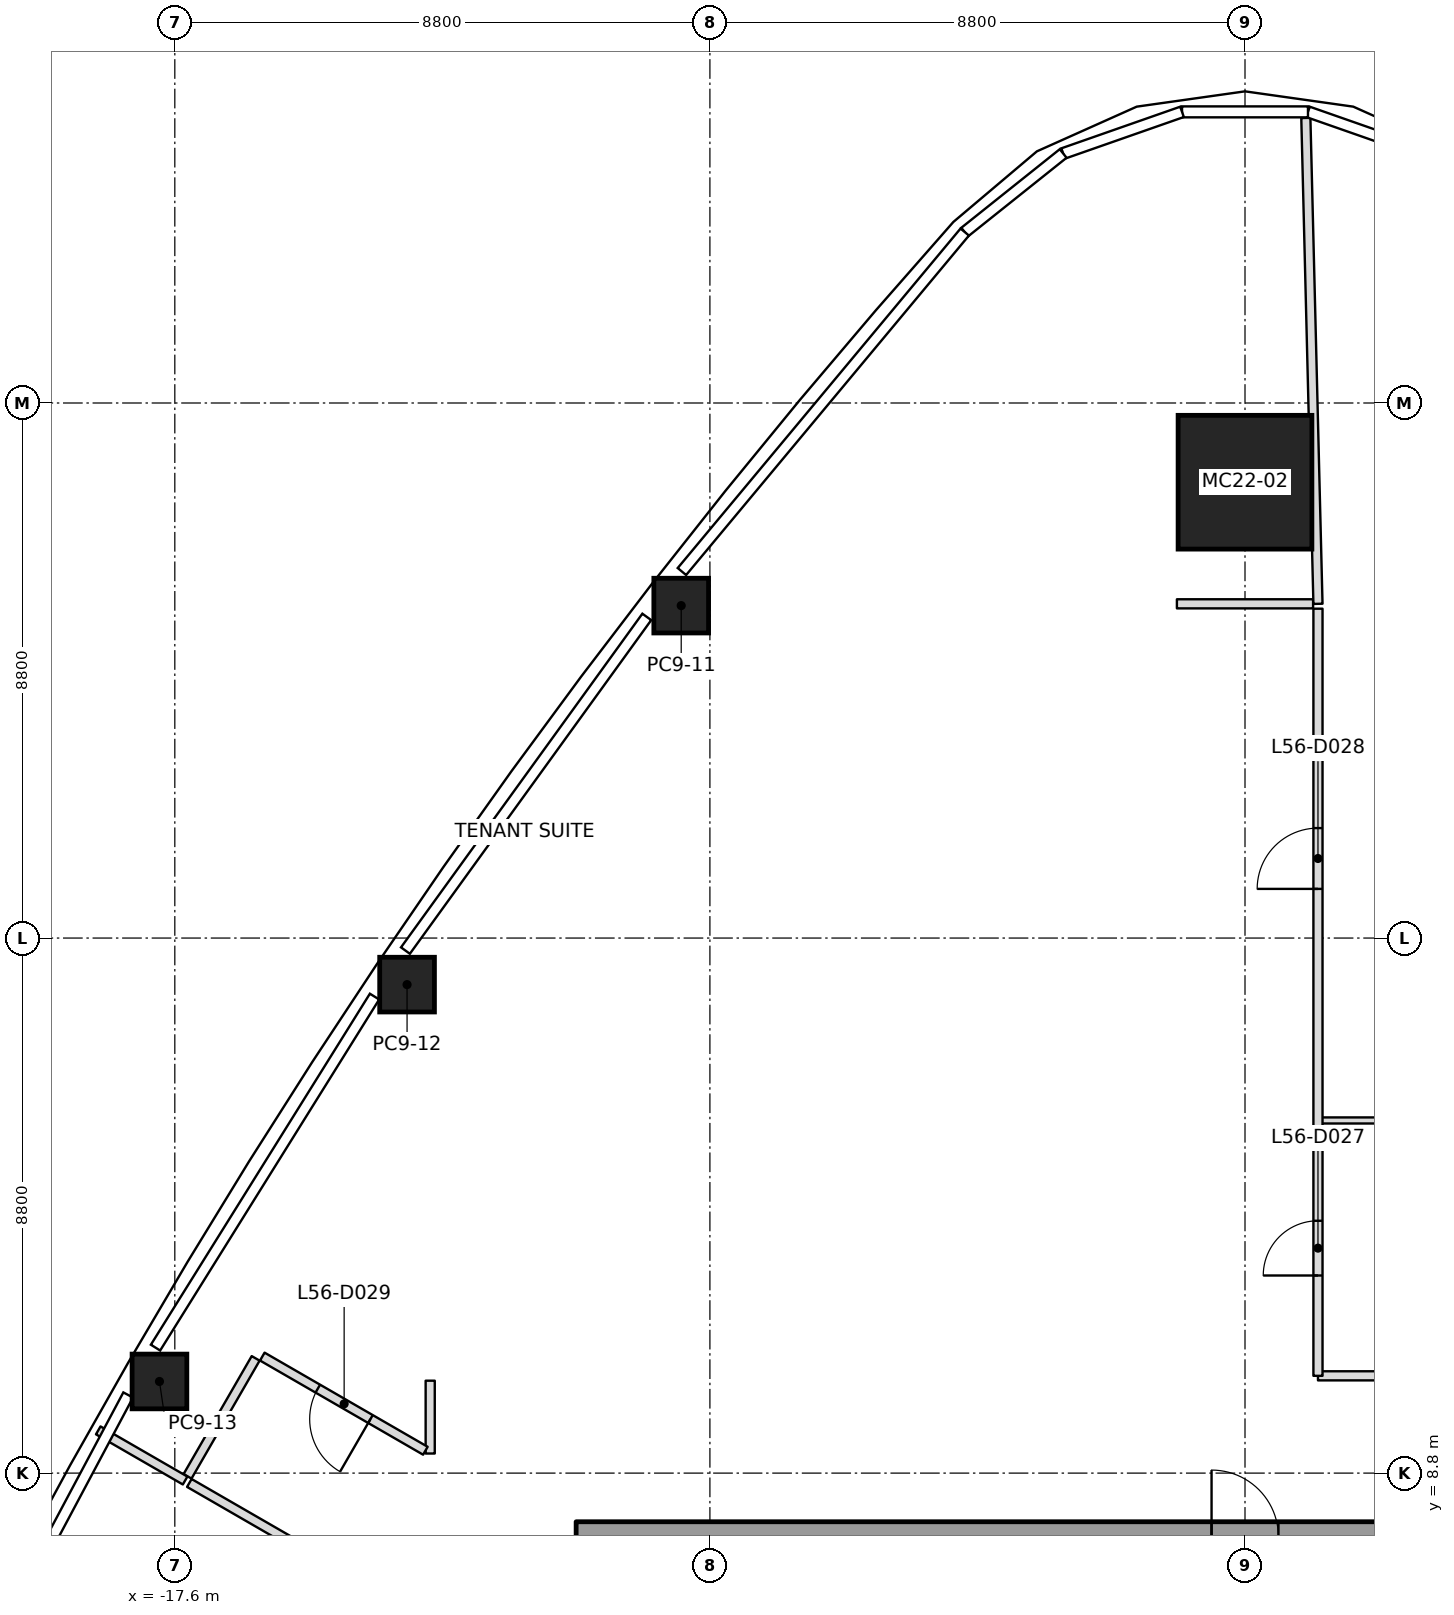
"""IFC4 building model, lengths in metres.
Left out: names, types, materials, properties, quantities, classifications, styles, units other than length and angle.
Written with IfcOpenShell. Run it as: python <this file> out.ifc"""

import sys

from ifc_helpers import new_model, si_unit, direction, frame, frame_2d, origin, origin_2d, place, context, subcontext, project, spatial, rectangle, extrude, element, fill, save


model = new_model("IFC4")
c1 = context("Model", 3, precision=1e-05, world=origin(), true_north=direction((0.0, 1.0)))
c2 = subcontext(c1, "Body", "Model", "MODEL_VIEW")
j1 = project(units=[si_unit("LENGTHUNIT", "METRE"), si_unit("PLANEANGLEUNIT", "RADIAN")], contexts=[c1])
p1 = place(None, origin())
s1 = spatial("IfcSite", under=j1, at=p1, CompositionType="ELEMENT")
p2 = place(p1, origin())
s2 = spatial("IfcBuilding", under=s1, at=p2, CompositionType="ELEMENT")
p3 = place(p2, frame((0.0, 0.0, 251.0)))
s3 = spatial("IfcBuildingStorey", under=s2, at=p3, CompositionType="ELEMENT", Elevation=251.0)
p4 = place(p3, frame((0.0, 25.097, 0.0), z_axis=(0.0, -0.032148900677, 0.999483090495), x_axis=(1.0, 0.0, 0.0)))
e1 = element("IfcColumn", 1, at=p4, inside=s3, PredefinedType="COLUMN", context=c2, shape_type="SweptSolid", body=[
    extrude(rectangle(XDim=2.2, YDim=2.2, at=origin_2d()), origin(), (0.0, 0.0, 1.0), 4.002),
])
p5 = place(p3, frame((-9.272, 23.068, 0.0), z_axis=(0.000244089904, -0.020381506962, 0.999792245716), x_axis=(0.613402004991, 0.789609823037, 0.015947025932)))
e2 = element("IfcColumn", 2, at=p5, inside=s3, PredefinedType="COLUMN", context=c2, shape_type="SweptSolid", body=[
    extrude(rectangle(XDim=0.9, YDim=0.9, at=origin_2d()), origin(), (0.0, 0.0, 1.0), 4.001),
])
p6 = place(p3, frame((-13.781, 16.834, 0.0), z_axis=(0.00530952661, -0.013121243922, 0.999899815924), x_axis=(0.557996523735, 0.829805432153, 0.007926176169)))
e3 = element("IfcColumn", 3, at=p6, inside=s3, PredefinedType="COLUMN", context=c2, shape_type="SweptSolid", body=[
    extrude(rectangle(XDim=0.9, YDim=0.9, at=origin_2d()), origin(), (0.0, 0.0, 1.0), 4.0),
])
p7 = place(p3, frame((-17.853, 10.307, 0.0), z_axis=(0.009887049298, -0.00573692984, 0.999934664812), x_axis=(0.499975560967, 0.866039512843, 2.5126546e-05)))
e4 = element("IfcColumn", 4, at=p7, inside=s3, PredefinedType="COLUMN", context=c2, shape_type="SweptSolid", body=[
    extrude(rectangle(XDim=0.9, YDim=0.9, at=origin_2d()), origin(), (0.0, 0.0, 1.0), 4.0),
])
p8 = place(p3, frame((-11.0, 7.75, 0.0), z_axis=(0.0, 0.0, 1.0), x_axis=(1.0, 0.0, 0.0)))
e5 = element("IfcWall", 5, at=p8, inside=s3, PredefinedType="SHEAR", context=c2, shape_type="SweptSolid", body=[
    extrude(rectangle(XDim=22.0, YDim=0.5, at=frame_2d((11.0, 0.0))), origin(), (0.0, 0.0, 1.0), 4.0),
])
p9 = place(p8, frame((10.45, 0.0, 0.0)))
e6 = element("IfcOpeningElement", 6, at=p9, cuts=e5, PredefinedType="OPENING", context=c2, shape_type="SweptSolid", body=[
    extrude(rectangle(XDim=1.1, YDim=2.1, at=frame_2d((0.55, 1.05))), frame((0.0, 0.25, 0.0), z_axis=(0.0, -1.0, 0.0), x_axis=(1.0, 0.0, 0.0)), (0.0, 0.0, 1.0), 0.5),
])
p10 = place(p3, frame((-17.431, 8.678, 0.0), z_axis=(0.0, 0.0, 1.0), x_axis=(-0.866067297121, 0.499927431592, 0.0)))
e7 = element("IfcWall", 7, at=p10, inside=s3, PredefinedType="PARTITIONING", context=c2, shape_type="SweptSolid", body=[
    extrude(rectangle(XDim=1.65, YDim=0.15, at=frame_2d((0.825, 0.0))), origin(), (0.0, 0.0, 1.0), 3.234),
])
p11 = place(p3, frame((1.2, 23.097, 0.0), z_axis=(0.0, 0.0, 1.0), x_axis=(-0.024952511821, 0.999688637604, 0.0)))
e8 = element("IfcWall", 8, at=p11, inside=s3, PredefinedType="PARTITIONING", context=c2, shape_type="SweptSolid", body=[
    extrude(rectangle(XDim=7.994, YDim=0.15, at=frame_2d((3.997, 0.0))), origin(), (0.0, 0.0, 1.0), 3.234),
])
p12 = place(p3, frame((-16.271, 10.687, 0.0), z_axis=(0.0, 0.0, 1.0), x_axis=(-0.500077830873, -0.865980463445, 0.0)))
e9 = element("IfcWall", 9, at=p12, inside=s3, PredefinedType="PARTITIONING", context=c2, shape_type="SweptSolid", body=[
    extrude(rectangle(XDim=2.24, YDim=0.15, at=frame_2d((1.12, 0.0))), origin(), (0.0, 0.0, 1.0), 3.45),
])
p13 = place(p3, frame((-17.361, 8.638, 0.0), z_axis=(0.0, 0.0, 1.0), x_axis=(0.866027379035, -0.49999657875, 0.0)))
e10 = element("IfcWall", 10, at=p13, inside=s3, PredefinedType="PARTITIONING", context=c2, shape_type="SweptSolid", body=[
    extrude(rectangle(XDim=4.574, YDim=0.15, at=frame_2d((2.287, 0.0))), origin(), (0.0, 0.0, 1.0), 3.45),
])
p14 = place(p3, frame((-13.4, 10.32, 0.0), z_axis=(0.0, 0.0, 1.0), x_axis=(0.0, -1.0, 0.0)))
e11 = element("IfcWall", 11, at=p14, inside=s3, PredefinedType="PARTITIONING", context=c2, shape_type="SweptSolid", body=[
    extrude(rectangle(XDim=1.198, YDim=0.15, at=frame_2d((0.599, 0.0))), origin(), (0.0, 0.0, 1.0), 3.45),
])
p15 = place(p3, frame((-13.479, 9.168, 0.0), z_axis=(0.0, 0.0, 1.0), x_axis=(-0.866051688794, 0.499954470265, 0.0)))
e12 = element("IfcWall", 12, at=p15, inside=s3, PredefinedType="PARTITIONING", context=c2, shape_type="SweptSolid", body=[
    extrude(rectangle(XDim=3.097, YDim=0.15, at=frame_2d((1.548, 0.0))), origin(), (0.0, 0.0, 1.0), 3.45),
])
p16 = place(p15, frame((1.043, 0.0, 0.0)))
e13 = element("IfcOpeningElement", 13, at=p16, cuts=e12, PredefinedType="OPENING", context=c2, shape_type="SweptSolid", body=[
    extrude(rectangle(XDim=1.0, YDim=2.1, at=frame_2d((0.5, 1.05))), frame((0.0, 0.075, 0.0), z_axis=(0.0, -1.0, 0.0), x_axis=(1.0, 0.0, 0.0)), (0.0, 0.0, 1.0), 0.15),
])
p17 = place(p3, frame((1.12, 23.097, 0.0), z_axis=(0.0, 0.0, 1.0), x_axis=(-1.0, 0.0, 0.0)))
e14 = element("IfcWall", 14, at=p17, inside=s3, PredefinedType="PARTITIONING", context=c2, shape_type="SweptSolid", body=[
    extrude(rectangle(XDim=2.24, YDim=0.15, at=frame_2d((1.12, 0.0))), origin(), (0.0, 0.0, 1.0), 3.233),
])
p18 = place(p3, frame((9.12, 10.4, 0.0), z_axis=(0.0, 0.0, 1.0), x_axis=(-1.0, 0.0, 0.0)))
e15 = element("IfcWall", 15, at=p18, inside=s3, PredefinedType="PARTITIONING", context=c2, shape_type="SweptSolid", body=[
    extrude(rectangle(XDim=7.92, YDim=0.15, at=frame_2d((3.96, 0.0))), origin(), (0.0, 0.0, 1.0), 3.317),
])
p19 = place(p3, frame((1.2, 10.4, 0.0), z_axis=(0.0, 0.0, 1.0), x_axis=(0.0, 1.0, 0.0)))
e16 = element("IfcWall", 16, at=p19, inside=s3, PredefinedType="PARTITIONING", context=c2, shape_type="SweptSolid", body=[
    extrude(rectangle(XDim=12.617, YDim=0.15, at=frame_2d((6.309, 0.0))), origin(), (0.0, 0.0, 1.0), 3.317),
])
p20 = place(p19, frame((1.65, 0.0, 0.0)))
e17 = element("IfcOpeningElement", 17, at=p20, cuts=e16, PredefinedType="OPENING", context=c2, shape_type="SweptSolid", body=[
    extrude(rectangle(XDim=0.9, YDim=2.1, at=frame_2d((0.45, 1.05))), frame((0.0, 0.075, 0.0), z_axis=(0.0, -1.0, 0.0), x_axis=(1.0, 0.0, 0.0)), (0.0, 0.0, 1.0), 0.15),
])
p21 = place(p19, frame((8.009, 0.0, 0.0)))
e18 = element("IfcOpeningElement", 18, at=p21, cuts=e16, PredefinedType="OPENING", context=c2, shape_type="SweptSolid", body=[
    extrude(rectangle(XDim=1.0, YDim=2.1, at=frame_2d((0.5, 1.05))), frame((0.0, 0.075, 0.0), z_axis=(0.0, -1.0, 0.0), x_axis=(1.0, 0.0, 0.0)), (0.0, 0.0, 1.0), 0.15),
])
p22 = place(p3, frame((1.23, 14.6, 0.0), z_axis=(0.0, 0.0, 1.0), x_axis=(1.0, 0.0, 0.0)))
e19 = element("IfcWall", 19, at=p22, inside=s3, PredefinedType="PARTITIONING", context=c2, shape_type="SweptSolid", body=[
    extrude(rectangle(XDim=4.97, YDim=0.1, at=frame_2d((2.485, 0.0))), origin(), (0.0, 0.0, 1.0), 3.317),
])
p23 = place(p20, origin())
e20 = element("IfcDoor", 20, at=p23, inside=s3, OperationType="SINGLE_SWING_LEFT", PredefinedType="DOOR", context=c2, shape_type="SweptSolid", body=[
    extrude(rectangle(XDim=0.9, YDim=2.1, at=frame_2d((0.45, 1.05))), frame((0.0, 0.025, 0.0), z_axis=(0.0, -1.0, 0.0), x_axis=(1.0, 0.0, 0.0)), (0.0, 0.0, 1.0), 0.05),
])
fill(e17, e20)
p24 = place(p21, origin())
e21 = element("IfcDoor", 21, at=p24, inside=s3, OperationType="SINGLE_SWING_LEFT", PredefinedType="DOOR", context=c2, shape_type="SweptSolid", body=[
    extrude(rectangle(XDim=1.0, YDim=2.1, at=frame_2d((0.5, 1.05))), frame((0.0, 0.025, 0.0), z_axis=(0.0, -1.0, 0.0), x_axis=(1.0, 0.0, 0.0)), (0.0, 0.0, 1.0), 0.05),
])
fill(e18, e21)
p25 = place(p16, origin())
e22 = element("IfcDoor", 22, at=p25, inside=s3, OperationType="SINGLE_SWING_RIGHT", PredefinedType="DOOR", context=c2, shape_type="SweptSolid", body=[
    extrude(rectangle(XDim=1.0, YDim=2.1, at=frame_2d((0.5, 1.05))), frame((0.0, 0.025, 0.0), z_axis=(0.0, -1.0, 0.0), x_axis=(1.0, 0.0, 0.0)), (0.0, 0.0, 1.0), 0.05),
])
fill(e13, e22)
save(model, sys.argv[1])
